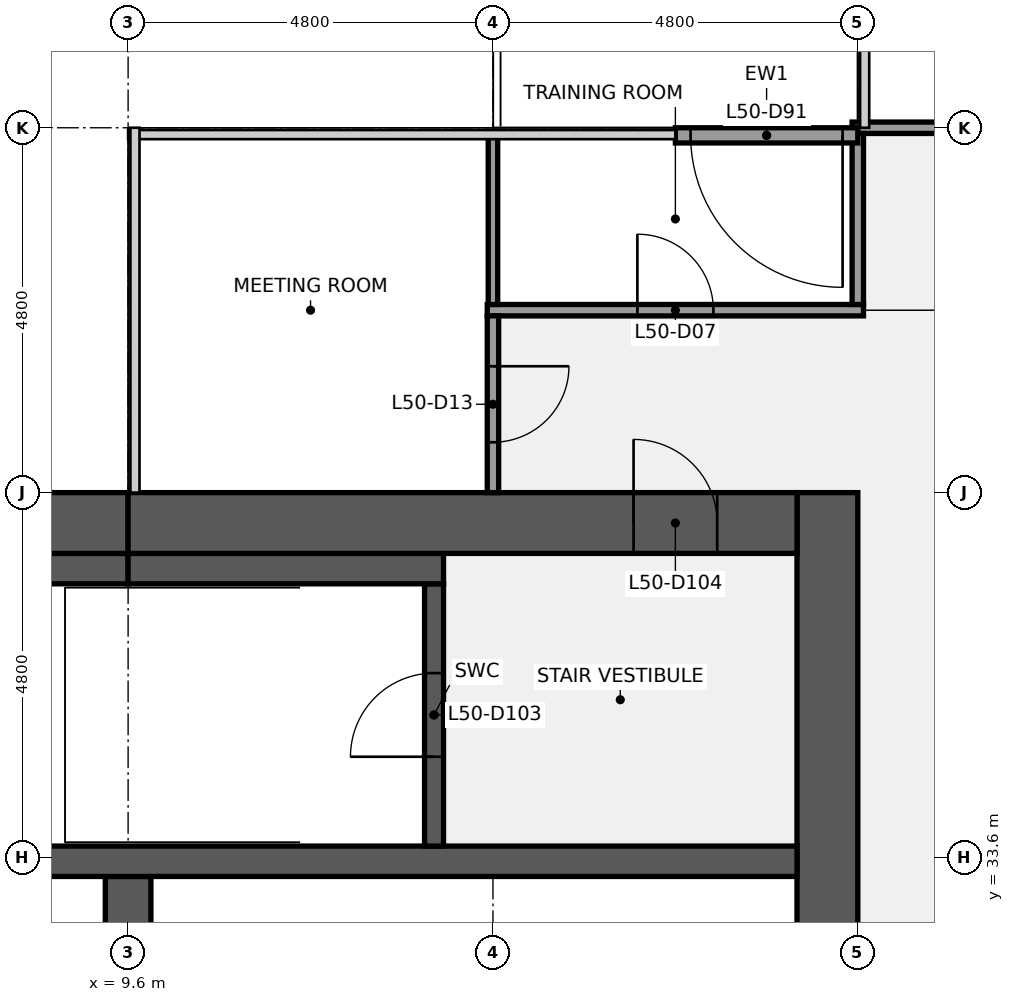
"""IFC4 building model, lengths in metres.
Left out: names, types, materials, properties, quantities, classifications, styles, units other than length and angle.
Written with IfcOpenShell. Run it as: python <this file> out.ifc"""

import sys

from ifc_helpers import new_model, si_unit, direction, frame, frame_2d, origin, place, context, subcontext, project, spatial, rectangle, extrude, element, fill, save


model = new_model("IFC4")
c1 = context("Model", 3, precision=1e-05, world=origin(), true_north=direction((0.0, 1.0)))
c2 = subcontext(c1, "Body", "Model", "MODEL_VIEW")
j1 = project(units=[si_unit("LENGTHUNIT", "METRE"), si_unit("PLANEANGLEUNIT", "RADIAN")], contexts=[c1])
p1 = place(None, origin())
s1 = spatial("IfcSite", under=j1, at=p1, CompositionType="ELEMENT")
p2 = place(p1, origin())
s2 = spatial("IfcBuilding", under=s1, at=p2, CompositionType="ELEMENT")
p3 = place(p2, frame((0.0, 0.0, 229.2)))
s3 = spatial("IfcBuildingStorey", under=s2, at=p3, CompositionType="ELEMENT", Elevation=229.2)
p4 = place(p3, frame((18.8, 38.4, 0.0), z_axis=(0.0, 0.0, 1.0), x_axis=(0.0, -1.0, 0.0)))
e1 = element("IfcWall", 1, at=p4, inside=s3, PredefinedType="SHEAR", context=c2, shape_type="SweptSolid", body=[
    extrude(rectangle(XDim=28.8, YDim=0.8, at=frame_2d((14.4, 0.0))), origin(), (0.0, 0.0, 1.0), 3.84),
])
p5 = place(p4, frame((18.3, 0.0, 0.0)))
e2 = element("IfcOpeningElement", 2, at=p5, cuts=e1, PredefinedType="OPENING", context=c2, shape_type="SweptSolid", body=[
    extrude(rectangle(XDim=1.8, YDim=2.1, at=frame_2d((0.9, 1.05))), frame((0.0, 0.41, 0.0), z_axis=(0.0, -1.0, 0.0), x_axis=(1.0, 0.0, 0.0)), (0.0, 0.0, 1.0), 0.82),
])
p6 = place(p4, frame((8.7, 0.0, 0.0)))
e3 = element("IfcOpeningElement", 3, at=p6, cuts=e1, PredefinedType="OPENING", context=c2, shape_type="SweptSolid", body=[
    extrude(rectangle(XDim=1.8, YDim=2.1, at=frame_2d((0.9, 1.05))), frame((0.0, 0.41, 0.0), z_axis=(0.0, -1.0, 0.0), x_axis=(1.0, 0.0, 0.0)), (0.0, 0.0, 1.0), 0.82),
])
p7 = place(p3, frame((9.6, 30.75, 0.0), z_axis=(0.0, 0.0, 1.0), x_axis=(0.0, 1.0, 0.0)))
e4 = element("IfcWall", 4, at=p7, inside=s3, PredefinedType="SHEAR", context=c2, shape_type="SweptSolid", body=[
    extrude(rectangle(XDim=2.6, YDim=0.6, at=frame_2d((1.3, 0.0))), origin(), (0.0, 0.0, 1.0), 3.84),
])
p8 = place(p3, frame((0.8, 33.55, 0.0), z_axis=(0.0, 0.0, 1.0), x_axis=(1.0, 0.0, 0.0)))
e5 = element("IfcWall", 5, at=p8, inside=s3, PredefinedType="SHEAR", context=c2, shape_type="SweptSolid", body=[
    extrude(rectangle(XDim=17.6, YDim=0.4, at=frame_2d((8.8, 0.0))), origin(), (0.0, 0.0, 1.0), 3.84),
])
p9 = place(p3, frame((13.625, 33.75, 0.0), z_axis=(0.0, 0.0, 1.0), x_axis=(0.0, 1.0, 0.0)))
e6 = element("IfcWall", 6, at=p9, inside=s3, PredefinedType="SHEAR", context=c2, shape_type="SweptSolid", body=[
    extrude(rectangle(XDim=3.45, YDim=0.25, at=frame_2d((1.725, 0.0))), origin(), (0.0, 0.0, 1.0), 3.84),
])
p10 = place(p9, frame((1.175, 0.0, 0.0)))
e7 = element("IfcOpeningElement", 7, at=p10, cuts=e6, PredefinedType="OPENING", context=c2, shape_type="SweptSolid", body=[
    extrude(rectangle(XDim=1.1, YDim=2.1, at=frame_2d((0.55, 1.05))), frame((0.0, 0.135, 0.0), z_axis=(0.0, -1.0, 0.0), x_axis=(1.0, 0.0, 0.0)), (0.0, 0.0, 1.0), 0.27),
])
p11 = place(p3, frame((6.25, 37.4, 0.0), z_axis=(0.0, 0.0, 1.0), x_axis=(1.0, 0.0, 0.0)))
e8 = element("IfcWall", 8, at=p11, inside=s3, PredefinedType="SHEAR", context=c2, shape_type="SweptSolid", body=[
    extrude(rectangle(XDim=3.35, YDim=0.4, at=frame_2d((1.675, 0.0))), origin(), (0.0, 0.0, 1.0), 3.84),
])
p12 = place(p3, frame((9.6, 37.4, 0.0), z_axis=(0.0, 0.0, 1.0), x_axis=(1.0, 0.0, 0.0)))
e9 = element("IfcWall", 9, at=p12, inside=s3, PredefinedType="SHEAR", context=c2, shape_type="SweptSolid", body=[
    extrude(rectangle(XDim=4.15, YDim=0.4, at=frame_2d((2.075, 0.0))), origin(), (0.0, 0.0, 1.0), 3.84),
])
p13 = place(p3, frame((0.8, 38.0, 0.0), z_axis=(0.0, 0.0, 1.0), x_axis=(1.0, 0.0, 0.0)))
e10 = element("IfcWall", 10, at=p13, inside=s3, PredefinedType="SHEAR", context=c2, shape_type="SweptSolid", body=[
    extrude(rectangle(XDim=8.8, YDim=0.8, at=frame_2d((4.4, 0.0))), origin(), (0.0, 0.0, 1.0), 3.84),
])
p14 = place(p13, frame((5.5, 0.0, 0.9)))
e11 = element("IfcOpeningElement", 11, at=p14, cuts=e10, PredefinedType="OPENING", context=c2, shape_type="SweptSolid", body=[
    extrude(rectangle(XDim=1.8, YDim=1.5, at=frame_2d((0.9, 0.75))), frame((0.0, 0.41, 0.0), z_axis=(0.0, -1.0, 0.0), x_axis=(1.0, 0.0, 0.0)), (0.0, 0.0, 1.0), 0.82),
])
p15 = place(p3, frame((9.6, 38.0, 0.0), z_axis=(0.0, 0.0, 1.0), x_axis=(1.0, 0.0, 0.0)))
e12 = element("IfcWall", 12, at=p15, inside=s3, PredefinedType="SHEAR", context=c2, shape_type="SweptSolid", body=[
    extrude(rectangle(XDim=8.8, YDim=0.8, at=frame_2d((4.4, 0.0))), origin(), (0.0, 0.0, 1.0), 3.84),
])
p16 = place(p15, frame((6.65, 0.0, 0.0)))
e13 = element("IfcOpeningElement", 13, at=p16, cuts=e12, PredefinedType="OPENING", context=c2, shape_type="SweptSolid", body=[
    extrude(rectangle(XDim=1.1, YDim=2.1, at=frame_2d((0.55, 1.05))), frame((0.0, 0.41, 0.0), z_axis=(0.0, -1.0, 0.0), x_axis=(1.0, 0.0, 0.0)), (0.0, 0.0, 1.0), 0.82),
])
p17 = place(p3, frame((14.325, 40.8, 0.0), z_axis=(0.0, 0.0, 1.0), x_axis=(1.0, 0.0, 0.0)))
e14 = element("IfcWall", 14, at=p17, inside=s3, PredefinedType="PARTITIONING", context=c2, shape_type="SweptSolid", body=[
    extrude(rectangle(XDim=4.95, YDim=0.15, at=frame_2d((2.475, 0.0))), origin(), (0.0, 0.0, 1.0), 2.849),
])
p18 = place(p17, frame((1.975, 0.0, 0.0)))
e15 = element("IfcOpeningElement", 15, at=p18, cuts=e14, PredefinedType="OPENING", context=c2, shape_type="SweptSolid", body=[
    extrude(rectangle(XDim=1.0, YDim=2.1, at=frame_2d((0.5, 1.05))), frame((0.0, 0.085, 0.0), z_axis=(0.0, -1.0, 0.0), x_axis=(1.0, 0.0, 0.0)), (0.0, 0.0, 1.0), 0.17),
])
p19 = place(p3, frame((19.125, 43.2, 0.0), z_axis=(0.0, 0.0, 1.0), x_axis=(1.0, 0.0, 0.0)))
e16 = element("IfcWall", 16, at=p19, inside=s3, PredefinedType="PARTITIONING", context=c2, shape_type="SweptSolid", body=[
    extrude(rectangle(XDim=19.35, YDim=0.15, at=frame_2d((9.675, 0.0))), origin(), (0.0, 0.0, 1.0), 2.849),
])
p20 = place(p19, frame((4.375, 0.0, 0.0)))
e17 = element("IfcOpeningElement", 17, at=p20, cuts=e16, PredefinedType="OPENING", context=c2, shape_type="SweptSolid", body=[
    extrude(rectangle(XDim=1.0, YDim=2.1, at=frame_2d((0.5, 1.05))), frame((0.0, 0.085, 0.0), z_axis=(0.0, -1.0, 0.0), x_axis=(1.0, 0.0, 0.0)), (0.0, 0.0, 1.0), 0.17),
])
p21 = place(p19, frame((13.975, 0.0, 0.0)))
e18 = element("IfcOpeningElement", 18, at=p21, cuts=e16, PredefinedType="OPENING", context=c2, shape_type="SweptSolid", body=[
    extrude(rectangle(XDim=1.0, YDim=2.1, at=frame_2d((0.5, 1.05))), frame((0.0, 0.085, 0.0), z_axis=(0.0, -1.0, 0.0), x_axis=(1.0, 0.0, 0.0)), (0.0, 0.0, 1.0), 0.17),
])
p22 = place(p3, frame((14.4, 40.875, 0.0), z_axis=(0.0, 0.0, 1.0), x_axis=(0.0, 1.0, 0.0)))
e19 = element("IfcWall", 19, at=p22, inside=s3, PredefinedType="PARTITIONING", context=c2, shape_type="SweptSolid", body=[
    extrude(rectangle(XDim=2.225, YDim=0.125, at=frame_2d((1.113, 0.0))), origin(), (0.0, 0.0, 1.0), 2.849),
])
p23 = place(p3, frame((14.4, 38.4, 0.0), z_axis=(0.0, 0.0, 1.0), x_axis=(0.0, 1.0, 0.0)))
e20 = element("IfcWall", 20, at=p23, inside=s3, PredefinedType="PARTITIONING", context=c2, shape_type="SweptSolid", body=[
    extrude(rectangle(XDim=2.325, YDim=0.15, at=frame_2d((1.163, 0.0))), origin(), (0.0, 0.0, 1.0), 2.849),
])
p24 = place(p23, frame((0.663, 0.0, 0.0)))
e21 = element("IfcOpeningElement", 21, at=p24, cuts=e20, PredefinedType="OPENING", context=c2, shape_type="SweptSolid", body=[
    extrude(rectangle(XDim=1.0, YDim=2.1, at=frame_2d((0.5, 1.05))), frame((0.0, 0.085, 0.0), z_axis=(0.0, -1.0, 0.0), x_axis=(1.0, 0.0, 0.0)), (0.0, 0.0, 1.0), 0.17),
])
p25 = place(p3, frame((19.2, 40.875, 0.0), z_axis=(0.0, 0.0, 1.0), x_axis=(0.0, 1.0, 0.0)))
e22 = element("IfcWall", 22, at=p25, inside=s3, PredefinedType="PARTITIONING", context=c2, shape_type="SweptSolid", body=[
    extrude(rectangle(XDim=2.25, YDim=0.15, at=frame_2d((1.125, 0.0))), origin(), (0.0, 0.0, 1.0), 2.849),
])
p26 = place(p3, frame((19.2, 43.1, 0.0), z_axis=(0.0, 0.0, 1.0), x_axis=(-1.0, 0.0, 0.0)))
e23 = element("IfcWall", 23, at=p26, inside=s3, PredefinedType="SOLIDWALL", context=c2, shape_type="SweptSolid", body=[
    extrude(rectangle(XDim=2.4, YDim=0.2, at=frame_2d((1.2, 0.0))), origin(), (0.0, 0.0, 1.0), 2.849),
])
p27 = place(p26, frame((0.2, 0.0, 0.0)))
e24 = element("IfcOpeningElement", 24, at=p27, cuts=e23, PredefinedType="OPENING", context=c2, shape_type="SweptSolid", body=[
    extrude(rectangle(XDim=2.0, YDim=2.1, at=frame_2d((1.0, 1.05))), frame((0.0, 0.11, 0.0), z_axis=(0.0, -1.0, 0.0), x_axis=(1.0, 0.0, 0.0)), (0.0, 0.0, 1.0), 0.22),
])
p28 = place(p10, origin())
e25 = element("IfcDoor", 25, at=p28, inside=s3, OperationType="SINGLE_SWING_LEFT", PredefinedType="DOOR", context=c2, shape_type="SweptSolid", body=[
    extrude(rectangle(XDim=1.1, YDim=2.1, at=frame_2d((0.55, 1.05))), frame((0.0, 0.025, 0.0), z_axis=(0.0, -1.0, 0.0), x_axis=(1.0, 0.0, 0.0)), (0.0, 0.0, 1.0), 0.05),
])
fill(e7, e25)
p29 = place(p16, origin())
e26 = element("IfcDoor", 26, at=p29, inside=s3, OperationType="SINGLE_SWING_LEFT", PredefinedType="DOOR", context=c2, shape_type="SweptSolid", body=[
    extrude(rectangle(XDim=1.1, YDim=2.1, at=frame_2d((0.55, 1.05))), frame((0.0, 0.025, 0.0), z_axis=(0.0, -1.0, 0.0), x_axis=(1.0, 0.0, 0.0)), (0.0, 0.0, 1.0), 0.05),
])
fill(e13, e26)
p30 = place(p18, origin())
e27 = element("IfcDoor", 27, at=p30, inside=s3, OperationType="SINGLE_SWING_LEFT", PredefinedType="DOOR", context=c2, shape_type="SweptSolid", body=[
    extrude(rectangle(XDim=1.0, YDim=2.1, at=frame_2d((0.5, 1.05))), frame((0.0, 0.025, 0.0), z_axis=(0.0, -1.0, 0.0), x_axis=(1.0, 0.0, 0.0)), (0.0, 0.0, 1.0), 0.05),
])
fill(e15, e27)
p31 = place(p24, origin())
e28 = element("IfcDoor", 28, at=p31, inside=s3, OperationType="SINGLE_SWING_RIGHT", PredefinedType="DOOR", context=c2, shape_type="SweptSolid", body=[
    extrude(rectangle(XDim=1.0, YDim=2.1, at=frame_2d((0.5, 1.05))), frame((0.0, 0.025, 0.0), z_axis=(0.0, -1.0, 0.0), x_axis=(1.0, 0.0, 0.0)), (0.0, 0.0, 1.0), 0.05),
])
fill(e21, e28)
p32 = place(p27, origin())
e29 = element("IfcDoor", 29, at=p32, inside=s3, OperationType="SINGLE_SWING_LEFT", PredefinedType="DOOR", context=c2, shape_type="SweptSolid", body=[
    extrude(rectangle(XDim=2.0, YDim=2.1, at=frame_2d((1.0, 1.05))), frame((0.0, 0.025, 0.0), z_axis=(0.0, -1.0, 0.0), x_axis=(1.0, 0.0, 0.0)), (0.0, 0.0, 1.0), 0.05),
])
fill(e24, e29)
save(model, sys.argv[1])
